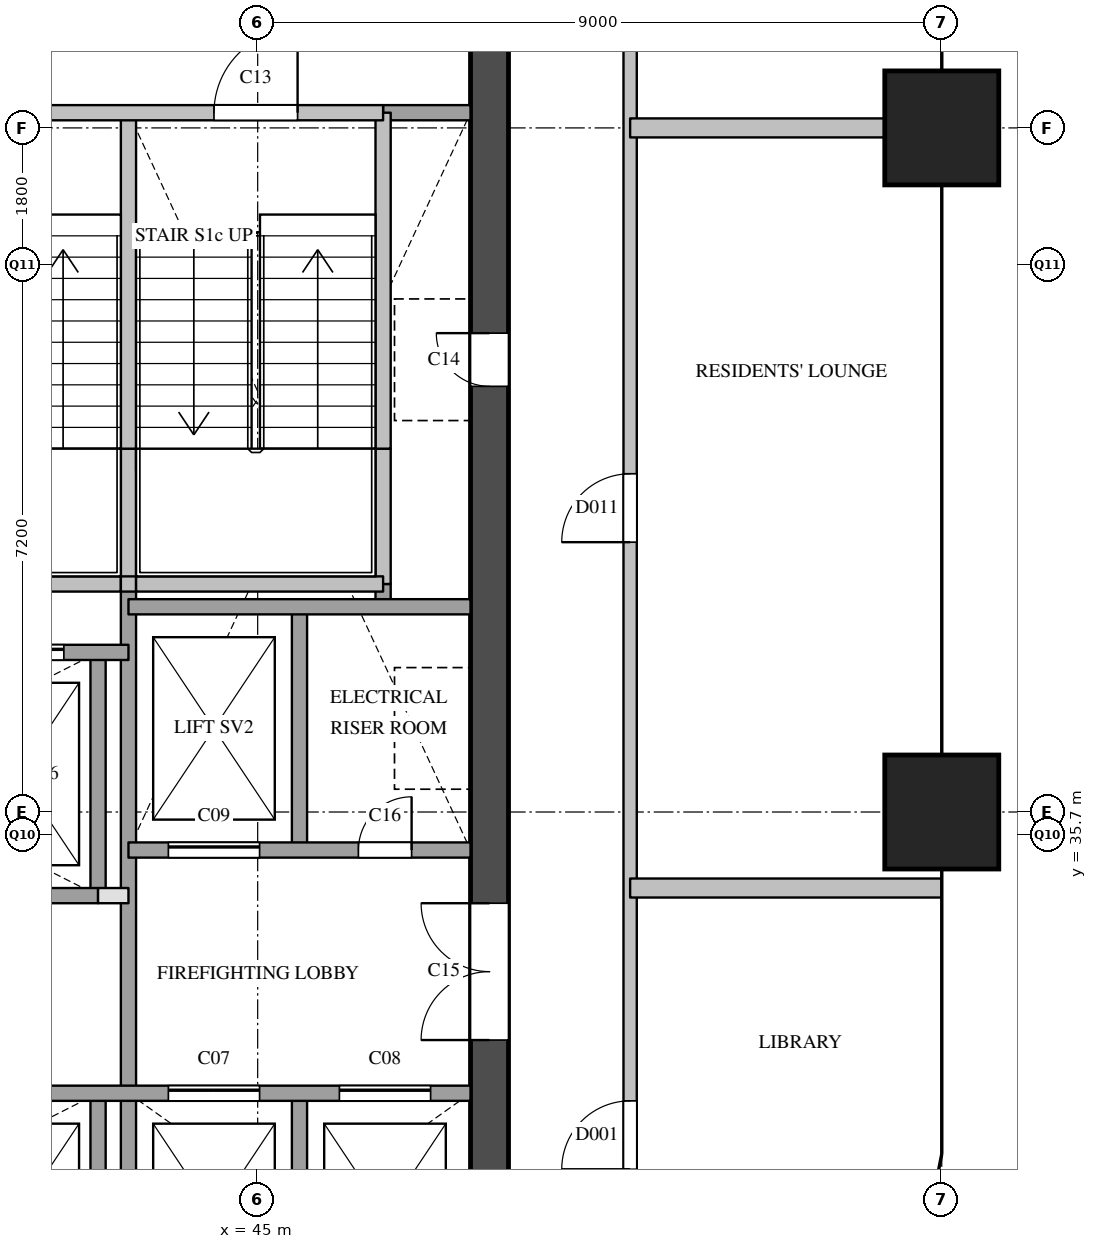
"""IFC4 building model, lengths in metres.
Left out: names, types, materials, properties, quantities, classifications, styles, units other than length and angle.
Written with IfcOpenShell. Run it as: python <this file> out.ifc"""

import sys

from ifc_helpers import new_model, si_unit, direction, frame, frame_2d, origin, origin_2d, place, context, subcontext, project, spatial, rectangle, extrude, element, fill, save


model = new_model("IFC4")
c1 = context("Model", 3, precision=1e-05, world=origin(), true_north=direction((0.0, 1.0)))
c2 = subcontext(c1, "Body", "Model", "MODEL_VIEW")
j1 = project(units=[si_unit("LENGTHUNIT", "METRE"), si_unit("PLANEANGLEUNIT", "RADIAN")], contexts=[c1])
p1 = place(None, origin())
s1 = spatial("IfcSite", under=j1, at=p1, CompositionType="ELEMENT")
p2 = place(p1, origin())
s2 = spatial("IfcBuilding", under=s1, at=p2, CompositionType="ELEMENT")
p3 = place(p2, frame((0.0, 0.0, 134.9)))
s3 = spatial("IfcBuildingStorey", under=s2, at=p3, CompositionType="ELEMENT", Elevation=134.9)
for number, where, z_axis, x_axis in (
    (1, (54.0, 36.0, 0.0), (0.0, 0.0, 1.0), (1.0, 0.0, 0.0)),
    (2, (54.0, 45.0, 0.0), (0.0, 0.0, 1.0), (1.0, 0.0, 0.0)),
):
    element("IfcColumn", number, at=place(p3, frame(where, z_axis=z_axis, x_axis=x_axis)), inside=s3, PredefinedType="COLUMN", context=c2, shape_type="SweptSolid", body=[
        extrude(rectangle(XDim=1.5, YDim=1.5, at=origin_2d()), origin(), (0.0, 0.0, 1.0), 3.9),
    ])
p4 = place(p3, frame((48.05, 29.1, 0.0), z_axis=(0.0, 0.0, 1.0), x_axis=(0.0, 1.0, 0.0)))
e3 = element("IfcWall", 3, at=p4, inside=s3, PredefinedType="SHEAR", context=c2, shape_type="SweptSolid", body=[
    extrude(rectangle(XDim=20.3, YDim=0.5, at=frame_2d((10.15, 0.0))), origin(), (0.0, 0.0, 1.0), 3.6),
])
p5 = place(p4, frame((12.5, 0.0, 0.0)))
e4 = element("IfcOpeningElement", 4, at=p5, cuts=e3, PredefinedType="OPENING", context=c2, shape_type="SweptSolid", body=[
    extrude(rectangle(XDim=0.7, YDim=2.1, at=frame_2d((0.35, 1.05))), frame((0.0, 0.26, 0.0), z_axis=(0.0, -1.0, 0.0), x_axis=(1.0, 0.0, 0.0)), (0.0, 0.0, 1.0), 0.52),
])
p6 = place(p4, frame((3.9, 0.0, 0.0)))
e5 = element("IfcOpeningElement", 5, at=p6, cuts=e3, PredefinedType="OPENING", context=c2, shape_type="SweptSolid", body=[
    extrude(rectangle(XDim=1.8, YDim=2.1, at=frame_2d((0.9, 1.05))), frame((0.0, 0.26, 0.0), z_axis=(0.0, -1.0, 0.0), x_axis=(1.0, 0.0, 0.0)), (0.0, 0.0, 1.0), 0.52),
])
p7 = place(p3, frame((42.9, 29.1, 0.0), z_axis=(0.0, 0.0, 1.0), x_axis=(0.0, 1.0, 0.0)))
e6 = element("IfcWall", 6, at=p7, inside=s3, PredefinedType="SOLIDWALL", context=c2, shape_type="SweptSolid", body=[
    extrude(rectangle(XDim=3.2, YDim=0.2, at=frame_2d((1.6, 0.0))), origin(), (0.0, 0.0, 1.0), 3.6),
])
p8 = place(p3, frame((42.9, 34.9, 0.0), z_axis=(0.0, 0.0, 1.0), x_axis=(0.0, 1.0, 0.0)))
e7 = element("IfcWall", 7, at=p8, inside=s3, PredefinedType="SOLIDWALL", context=c2, shape_type="SweptSolid", body=[
    extrude(rectangle(XDim=3.2, YDim=0.2, at=frame_2d((1.6, 0.0))), origin(), (0.0, 0.0, 1.0), 3.6),
])
p9 = place(p3, frame((43.3, 29.1, 0.0), z_axis=(0.0, 0.0, 1.0), x_axis=(0.0, 1.0, 0.0)))
e8 = element("IfcWall", 8, at=p9, inside=s3, PredefinedType="SOLIDWALL", context=c2, shape_type="SweptSolid", body=[
    extrude(rectangle(XDim=9.9, YDim=0.2, at=frame_2d((4.95, 0.0))), origin(), (0.0, 0.0, 1.0), 3.6),
])
p10 = place(p3, frame((43.3, 39.0, 0.0), z_axis=(0.0, 0.0, 1.0), x_axis=(0.0, 1.0, 0.0)))
e9 = element("IfcWall", 9, at=p10, inside=s3, PredefinedType="SOLIDWALL", context=c2, shape_type="SweptSolid", body=[
    extrude(rectangle(XDim=1.78, YDim=0.2, at=frame_2d((0.89, 0.0))), origin(), (0.0, 0.0, 1.0), 3.6),
])
p11 = place(p3, frame((43.3, 40.78, 0.0), z_axis=(0.0, 0.0, 1.0), x_axis=(0.0, 1.0, 0.0)))
e10 = element("IfcWall", 10, at=p11, inside=s3, PredefinedType="SOLIDWALL", context=c2, shape_type="SweptSolid", body=[
    extrude(rectangle(XDim=4.42, YDim=0.2, at=frame_2d((2.21, 0.0))), origin(), (0.0, 0.0, 1.0), 3.6),
])
for number, where, z_axis, x_axis in (
    (11, (45.55, 29.1, 0.0), (0.0, 0.0, 1.0), (0.0, 1.0, 0.0)),
    (12, (45.55, 35.5, 0.0), (0.0, 0.0, 1.0), (0.0, 1.0, 0.0)),
):
    element("IfcWall", number, at=place(p3, frame(where, z_axis=z_axis, x_axis=x_axis)), inside=s3, PredefinedType="SOLIDWALL", context=c2, shape_type="SweptSolid", body=[
        extrude(rectangle(XDim=3.2, YDim=0.2, at=frame_2d((1.6, 0.0))), origin(), (0.0, 0.0, 1.0), 3.6),
    ])
p12 = place(p3, frame((46.65, 38.7, 0.0), z_axis=(0.0, 0.0, 1.0), x_axis=(0.0, 1.0, 0.0)))
e13 = element("IfcWall", 13, at=p12, inside=s3, PredefinedType="SOLIDWALL", context=c2, shape_type="SweptSolid", body=[
    extrude(rectangle(XDim=0.3, YDim=0.2, at=frame_2d((0.15, 0.0))), origin(), (0.0, 0.0, 1.0), 3.6),
])
p13 = place(p3, frame((46.65, 39.0, 0.0), z_axis=(0.0, 0.0, 1.0), x_axis=(0.0, 1.0, 0.0)))
e14 = element("IfcWall", 14, at=p13, inside=s3, PredefinedType="SOLIDWALL", context=c2, shape_type="SweptSolid", body=[
    extrude(rectangle(XDim=1.78, YDim=0.2, at=frame_2d((0.89, 0.0))), origin(), (0.0, 0.0, 1.0), 3.6),
])
p14 = place(p3, frame((46.65, 40.78, 0.0), z_axis=(0.0, 0.0, 1.0), x_axis=(0.0, 1.0, 0.0)))
e15 = element("IfcWall", 15, at=p14, inside=s3, PredefinedType="SOLIDWALL", context=c2, shape_type="SweptSolid", body=[
    extrude(rectangle(XDim=4.42, YDim=0.2, at=frame_2d((2.21, 0.0))), origin(), (0.0, 0.0, 1.0), 3.6),
])
p15 = place(p3, frame((36.6, 32.3, 0.0), z_axis=(0.0, 0.0, 1.0), x_axis=(1.0, 0.0, 0.0)))
e16 = element("IfcWall", 16, at=p15, inside=s3, PredefinedType="SOLIDWALL", context=c2, shape_type="SweptSolid", body=[
    extrude(rectangle(XDim=11.2, YDim=0.2, at=frame_2d((5.6, 0.0))), origin(), (0.0, 0.0, 1.0), 3.6),
])
p16 = place(p15, frame((7.225, 0.0, 0.0)))
e17 = element("IfcOpeningElement", 17, at=p16, cuts=e16, PredefinedType="OPENING", context=c2, shape_type="SweptSolid", body=[
    extrude(rectangle(XDim=1.2, YDim=2.1, at=frame_2d((0.6, 1.05))), frame((0.0, 0.11, 0.0), z_axis=(0.0, -1.0, 0.0), x_axis=(1.0, 0.0, 0.0)), (0.0, 0.0, 1.0), 0.22),
])
p17 = place(p15, frame((9.475, 0.0, 0.0)))
e18 = element("IfcOpeningElement", 18, at=p17, cuts=e16, PredefinedType="OPENING", context=c2, shape_type="SweptSolid", body=[
    extrude(rectangle(XDim=1.2, YDim=2.1, at=frame_2d((0.6, 1.05))), frame((0.0, 0.11, 0.0), z_axis=(0.0, -1.0, 0.0), x_axis=(1.0, 0.0, 0.0)), (0.0, 0.0, 1.0), 0.22),
])
p18 = place(p3, frame((42.9, 34.9, 0.0), z_axis=(0.0, 0.0, 1.0), x_axis=(1.0, 0.0, 0.0)))
e19 = element("IfcWall", 19, at=p18, inside=s3, PredefinedType="PARTITIONING", context=c2, shape_type="SweptSolid", body=[
    extrude(rectangle(XDim=0.4, YDim=0.2, at=frame_2d((0.2, 0.0))), origin(), (0.0, 0.0, 1.0), 3.6),
])
p19 = place(p3, frame((36.6, 34.9, 0.0), z_axis=(0.0, 0.0, 1.0), x_axis=(1.0, 0.0, 0.0)))
e20 = element("IfcWall", 20, at=p19, inside=s3, PredefinedType="SOLIDWALL", context=c2, shape_type="SweptSolid", body=[
    extrude(rectangle(XDim=6.3, YDim=0.2, at=frame_2d((3.15, 0.0))), origin(), (0.0, 0.0, 1.0), 3.6),
])
p20 = place(p3, frame((43.3, 35.5, 0.0), z_axis=(0.0, 0.0, 1.0), x_axis=(1.0, 0.0, 0.0)))
e21 = element("IfcWall", 21, at=p20, inside=s3, PredefinedType="SOLIDWALL", context=c2, shape_type="SweptSolid", body=[
    extrude(rectangle(XDim=4.5, YDim=0.2, at=frame_2d((2.25, 0.0))), origin(), (0.0, 0.0, 1.0), 3.6),
])
p21 = place(p20, frame((0.525, 0.0, 0.0)))
e22 = element("IfcOpeningElement", 22, at=p21, cuts=e21, PredefinedType="OPENING", context=c2, shape_type="SweptSolid", body=[
    extrude(rectangle(XDim=1.2, YDim=2.1, at=frame_2d((0.6, 1.05))), frame((0.0, 0.11, 0.0), z_axis=(0.0, -1.0, 0.0), x_axis=(1.0, 0.0, 0.0)), (0.0, 0.0, 1.0), 0.22),
])
p22 = place(p20, frame((3.025, 0.0, 0.0)))
e23 = element("IfcOpeningElement", 23, at=p22, cuts=e21, PredefinedType="OPENING", context=c2, shape_type="SweptSolid", body=[
    extrude(rectangle(XDim=0.7, YDim=2.1, at=frame_2d((0.35, 1.05))), frame((0.0, 0.11, 0.0), z_axis=(0.0, -1.0, 0.0), x_axis=(1.0, 0.0, 0.0)), (0.0, 0.0, 1.0), 0.22),
])
p23 = place(p3, frame((36.6, 38.1, 0.0), z_axis=(0.0, 0.0, 1.0), x_axis=(1.0, 0.0, 0.0)))
e24 = element("IfcWall", 24, at=p23, inside=s3, PredefinedType="SOLIDWALL", context=c2, shape_type="SweptSolid", body=[
    extrude(rectangle(XDim=6.7, YDim=0.2, at=frame_2d((3.35, 0.0))), origin(), (0.0, 0.0, 1.0), 3.6),
])
p24 = place(p23, frame((0.45, 0.0, 0.0)))
e25 = element("IfcOpeningElement", 25, at=p24, cuts=e24, PredefinedType="OPENING", context=c2, shape_type="SweptSolid", body=[
    extrude(rectangle(XDim=1.2, YDim=2.1, at=frame_2d((0.6, 1.05))), frame((0.0, 0.11, 0.0), z_axis=(0.0, -1.0, 0.0), x_axis=(1.0, 0.0, 0.0)), (0.0, 0.0, 1.0), 0.22),
])
p25 = place(p23, frame((2.55, 0.0, 0.0)))
e26 = element("IfcOpeningElement", 26, at=p25, cuts=e24, PredefinedType="OPENING", context=c2, shape_type="SweptSolid", body=[
    extrude(rectangle(XDim=1.2, YDim=2.1, at=frame_2d((0.6, 1.05))), frame((0.0, 0.11, 0.0), z_axis=(0.0, -1.0, 0.0), x_axis=(1.0, 0.0, 0.0)), (0.0, 0.0, 1.0), 0.22),
])
p26 = place(p23, frame((4.65, 0.0, 0.0)))
e27 = element("IfcOpeningElement", 27, at=p26, cuts=e24, PredefinedType="OPENING", context=c2, shape_type="SweptSolid", body=[
    extrude(rectangle(XDim=1.2, YDim=2.1, at=frame_2d((0.6, 1.05))), frame((0.0, 0.11, 0.0), z_axis=(0.0, -1.0, 0.0), x_axis=(1.0, 0.0, 0.0)), (0.0, 0.0, 1.0), 0.22),
])
p27 = place(p3, frame((43.3, 38.7, 0.0), z_axis=(0.0, 0.0, 1.0), x_axis=(1.0, 0.0, 0.0)))
e28 = element("IfcWall", 28, at=p27, inside=s3, PredefinedType="SOLIDWALL", context=c2, shape_type="SweptSolid", body=[
    extrude(rectangle(XDim=4.5, YDim=0.2, at=frame_2d((2.25, 0.0))), origin(), (0.0, 0.0, 1.0), 3.6),
])
p28 = place(p3, frame((40.05, 39.0, 0.0), z_axis=(0.0, 0.0, 1.0), x_axis=(1.0, 0.0, 0.0)))
e29 = element("IfcWall", 29, at=p28, inside=s3, PredefinedType="SOLIDWALL", context=c2, shape_type="SweptSolid", body=[
    extrude(rectangle(XDim=3.15, YDim=0.2, at=frame_2d((1.575, 0.0))), origin(), (0.0, 0.0, 1.0), 3.6),
])
p29 = place(p3, frame((43.2, 39.0, 0.0), z_axis=(0.0, 0.0, 1.0), x_axis=(1.0, 0.0, 0.0)))
e30 = element("IfcWall", 30, at=p29, inside=s3, PredefinedType="SOLIDWALL", context=c2, shape_type="SweptSolid", body=[
    extrude(rectangle(XDim=0.2, YDim=0.2, at=frame_2d((0.1, 0.0))), origin(), (0.0, 0.0, 1.0), 3.6),
])
p30 = place(p3, frame((43.4, 39.0, 0.0), z_axis=(0.0, 0.0, 1.0), x_axis=(1.0, 0.0, 0.0)))
e31 = element("IfcWall", 31, at=p30, inside=s3, PredefinedType="SOLIDWALL", context=c2, shape_type="SweptSolid", body=[
    extrude(rectangle(XDim=3.25, YDim=0.2, at=frame_2d((1.625, 0.0))), origin(), (0.0, 0.0, 1.0), 3.6),
])
p31 = place(p3, frame((46.65, 45.2, 0.0), z_axis=(0.0, 0.0, 1.0), x_axis=(1.0, 0.0, 0.0)))
e32 = element("IfcWall", 32, at=p31, inside=s3, PredefinedType="SOLIDWALL", context=c2, shape_type="SweptSolid", body=[
    extrude(rectangle(XDim=1.15, YDim=0.2, at=frame_2d((0.575, 0.0))), origin(), (0.0, 0.0, 1.0), 3.6),
])
p32 = place(p3, frame((36.6, 45.2, 0.0), z_axis=(0.0, 0.0, 1.0), x_axis=(1.0, 0.0, 0.0)))
e33 = element("IfcWall", 33, at=p32, inside=s3, PredefinedType="SOLIDWALL", context=c2, shape_type="SweptSolid", body=[
    extrude(rectangle(XDim=10.05, YDim=0.2, at=frame_2d((5.025, 0.0))), origin(), (0.0, 0.0, 1.0), 3.6),
])
p33 = place(p32, frame((1.125, 0.0, 0.0)))
e34 = element("IfcOpeningElement", 34, at=p33, cuts=e33, PredefinedType="OPENING", context=c2, shape_type="SweptSolid", body=[
    extrude(rectangle(XDim=1.1, YDim=2.1, at=frame_2d((0.55, 1.05))), frame((0.0, 0.11, 0.0), z_axis=(0.0, -1.0, 0.0), x_axis=(1.0, 0.0, 0.0)), (0.0, 0.0, 1.0), 0.22),
])
p34 = place(p32, frame((4.475, 0.0, 0.0)))
e35 = element("IfcOpeningElement", 35, at=p34, cuts=e33, PredefinedType="OPENING", context=c2, shape_type="SweptSolid", body=[
    extrude(rectangle(XDim=1.1, YDim=2.1, at=frame_2d((0.55, 1.05))), frame((0.0, 0.11, 0.0), z_axis=(0.0, -1.0, 0.0), x_axis=(1.0, 0.0, 0.0)), (0.0, 0.0, 1.0), 0.22),
])
p35 = place(p32, frame((7.825, 0.0, 0.0)))
e36 = element("IfcOpeningElement", 36, at=p35, cuts=e33, PredefinedType="OPENING", context=c2, shape_type="SweptSolid", body=[
    extrude(rectangle(XDim=1.1, YDim=2.1, at=frame_2d((0.55, 1.05))), frame((0.0, 0.11, 0.0), z_axis=(0.0, -1.0, 0.0), x_axis=(1.0, 0.0, 0.0)), (0.0, 0.0, 1.0), 0.22),
])
p36 = place(p3, frame((49.9, 28.5, 0.0), z_axis=(0.0, 0.0, 1.0), x_axis=(0.0, 1.0, 0.0)))
e37 = element("IfcWall", 37, at=p36, inside=s3, PredefinedType="PARTITIONING", context=c2, shape_type="SweptSolid", body=[
    extrude(rectangle(XDim=23.0, YDim=0.175, at=frame_2d((11.5, 0.0))), origin(), (0.0, 0.0, 1.0), 3.6),
])
p37 = place(p36, frame((2.8, 0.0, 0.0)))
e38 = element("IfcOpeningElement", 38, at=p37, cuts=e37, PredefinedType="OPENING", context=c2, shape_type="SweptSolid", body=[
    extrude(rectangle(XDim=0.9, YDim=2.1, at=frame_2d((0.45, 1.05))), frame((0.0, 0.097, 0.0), z_axis=(0.0, -1.0, 0.0), x_axis=(1.0, 0.0, 0.0)), (0.0, 0.0, 1.0), 0.195),
])
p38 = place(p36, frame((11.05, 0.0, 0.0)))
e39 = element("IfcOpeningElement", 39, at=p38, cuts=e37, PredefinedType="OPENING", context=c2, shape_type="SweptSolid", body=[
    extrude(rectangle(XDim=0.9, YDim=2.1, at=frame_2d((0.45, 1.05))), frame((0.0, 0.097, 0.0), z_axis=(0.0, -1.0, 0.0), x_axis=(1.0, 0.0, 0.0)), (0.0, 0.0, 1.0), 0.195),
])
p39 = place(p36, frame((19.3, 0.0, 0.0)))
e40 = element("IfcOpeningElement", 40, at=p39, cuts=e37, PredefinedType="OPENING", context=c2, shape_type="SweptSolid", body=[
    extrude(rectangle(XDim=0.9, YDim=2.1, at=frame_2d((0.45, 1.05))), frame((0.0, 0.097, 0.0), z_axis=(0.0, -1.0, 0.0), x_axis=(1.0, 0.0, 0.0)), (0.0, 0.0, 1.0), 0.195),
])
p40 = place(p3, frame((49.9, 35.0, 0.0), z_axis=(0.0, 0.0, 1.0), x_axis=(1.0, 0.0, 0.0)))
e41 = element("IfcWall", 41, at=p40, inside=s3, PredefinedType="PARTITIONING", context=c2, shape_type="SweptSolid", body=[
    extrude(rectangle(XDim=4.1, YDim=0.25, at=frame_2d((2.05, 0.0))), origin(), (0.0, 0.0, 1.0), 2.6),
])
p41 = place(p3, frame((49.9, 45.0, 0.0), z_axis=(0.0, 0.0, 1.0), x_axis=(1.0, 0.0, 0.0)))
e42 = element("IfcWall", 42, at=p41, inside=s3, PredefinedType="PARTITIONING", context=c2, shape_type="SweptSolid", body=[
    extrude(rectangle(XDim=4.1, YDim=0.25, at=frame_2d((2.05, 0.0))), origin(), (0.0, 0.0, 1.0), 3.6),
])
p42 = place(p26, origin())
e43 = element("IfcDoor", 43, at=p42, inside=s3, OperationType="SLIDING_TO_LEFT", PredefinedType="DOOR", context=c2, shape_type="SweptSolid", body=[
    extrude(rectangle(XDim=1.2, YDim=2.1, at=frame_2d((0.6, 1.05))), frame((0.0, 0.025, 0.0), z_axis=(0.0, -1.0, 0.0), x_axis=(1.0, 0.0, 0.0)), (0.0, 0.0, 1.0), 0.05),
])
fill(e27, e43)
p43 = place(p16, origin())
e44 = element("IfcDoor", 44, at=p43, inside=s3, OperationType="SLIDING_TO_LEFT", PredefinedType="DOOR", context=c2, shape_type="SweptSolid", body=[
    extrude(rectangle(XDim=1.2, YDim=2.1, at=frame_2d((0.6, 1.05))), frame((0.0, 0.025, 0.0), z_axis=(0.0, -1.0, 0.0), x_axis=(1.0, 0.0, 0.0)), (0.0, 0.0, 1.0), 0.05),
])
fill(e17, e44)
p44 = place(p17, origin())
e45 = element("IfcDoor", 45, at=p44, inside=s3, OperationType="SLIDING_TO_LEFT", PredefinedType="DOOR", context=c2, shape_type="SweptSolid", body=[
    extrude(rectangle(XDim=1.2, YDim=2.1, at=frame_2d((0.6, 1.05))), frame((0.0, 0.025, 0.0), z_axis=(0.0, -1.0, 0.0), x_axis=(1.0, 0.0, 0.0)), (0.0, 0.0, 1.0), 0.05),
])
fill(e18, e45)
p45 = place(p21, origin())
e46 = element("IfcDoor", 46, at=p45, inside=s3, OperationType="SLIDING_TO_LEFT", PredefinedType="DOOR", context=c2, shape_type="SweptSolid", body=[
    extrude(rectangle(XDim=1.2, YDim=2.1, at=frame_2d((0.6, 1.05))), frame((0.0, 0.025, 0.0), z_axis=(0.0, -1.0, 0.0), x_axis=(1.0, 0.0, 0.0)), (0.0, 0.0, 1.0), 0.05),
])
fill(e22, e46)
p46 = place(p35, origin())
e47 = element("IfcDoor", 47, at=p46, inside=s3, OperationType="SINGLE_SWING_RIGHT", PredefinedType="DOOR", context=c2, shape_type="SweptSolid", body=[
    extrude(rectangle(XDim=1.1, YDim=2.1, at=frame_2d((0.55, 1.05))), frame((0.0, 0.025, 0.0), z_axis=(0.0, -1.0, 0.0), x_axis=(1.0, 0.0, 0.0)), (0.0, 0.0, 1.0), 0.05),
])
fill(e36, e47)
p47 = place(p5, origin())
e48 = element("IfcDoor", 48, at=p47, inside=s3, OperationType="SINGLE_SWING_RIGHT", PredefinedType="DOOR", context=c2, shape_type="SweptSolid", body=[
    extrude(rectangle(XDim=0.7, YDim=2.1, at=frame_2d((0.35, 1.05))), frame((0.0, 0.025, 0.0), z_axis=(0.0, -1.0, 0.0), x_axis=(1.0, 0.0, 0.0)), (0.0, 0.0, 1.0), 0.05),
])
fill(e4, e48)
p48 = place(p6, origin())
e49 = element("IfcDoor", 49, at=p48, inside=s3, OperationType="DOUBLE_DOOR_SINGLE_SWING", PredefinedType="DOOR", context=c2, shape_type="SweptSolid", body=[
    extrude(rectangle(XDim=1.8, YDim=2.1, at=frame_2d((0.9, 1.05))), frame((0.0, 0.025, 0.0), z_axis=(0.0, -1.0, 0.0), x_axis=(1.0, 0.0, 0.0)), (0.0, 0.0, 1.0), 0.05),
])
fill(e5, e49)
p49 = place(p22, origin())
e50 = element("IfcDoor", 50, at=p49, inside=s3, OperationType="SINGLE_SWING_RIGHT", PredefinedType="DOOR", context=c2, shape_type="SweptSolid", body=[
    extrude(rectangle(XDim=0.7, YDim=2.1, at=frame_2d((0.35, 1.05))), frame((0.0, 0.025, 0.0), z_axis=(0.0, -1.0, 0.0), x_axis=(1.0, 0.0, 0.0)), (0.0, 0.0, 1.0), 0.05),
])
fill(e23, e50)
p50 = place(p37, origin())
e51 = element("IfcDoor", 51, at=p50, inside=s3, OperationType="SINGLE_SWING_LEFT", PredefinedType="DOOR", context=c2, shape_type="SweptSolid", body=[
    extrude(rectangle(XDim=0.9, YDim=2.1, at=frame_2d((0.45, 1.05))), frame((0.0, 0.025, 0.0), z_axis=(0.0, -1.0, 0.0), x_axis=(1.0, 0.0, 0.0)), (0.0, 0.0, 1.0), 0.05),
])
fill(e38, e51)
p51 = place(p38, origin())
e52 = element("IfcDoor", 52, at=p51, inside=s3, OperationType="SINGLE_SWING_LEFT", PredefinedType="DOOR", context=c2, shape_type="SweptSolid", body=[
    extrude(rectangle(XDim=0.9, YDim=2.1, at=frame_2d((0.45, 1.05))), frame((0.0, 0.025, 0.0), z_axis=(0.0, -1.0, 0.0), x_axis=(1.0, 0.0, 0.0)), (0.0, 0.0, 1.0), 0.05),
])
fill(e39, e52)
save(model, sys.argv[1])
